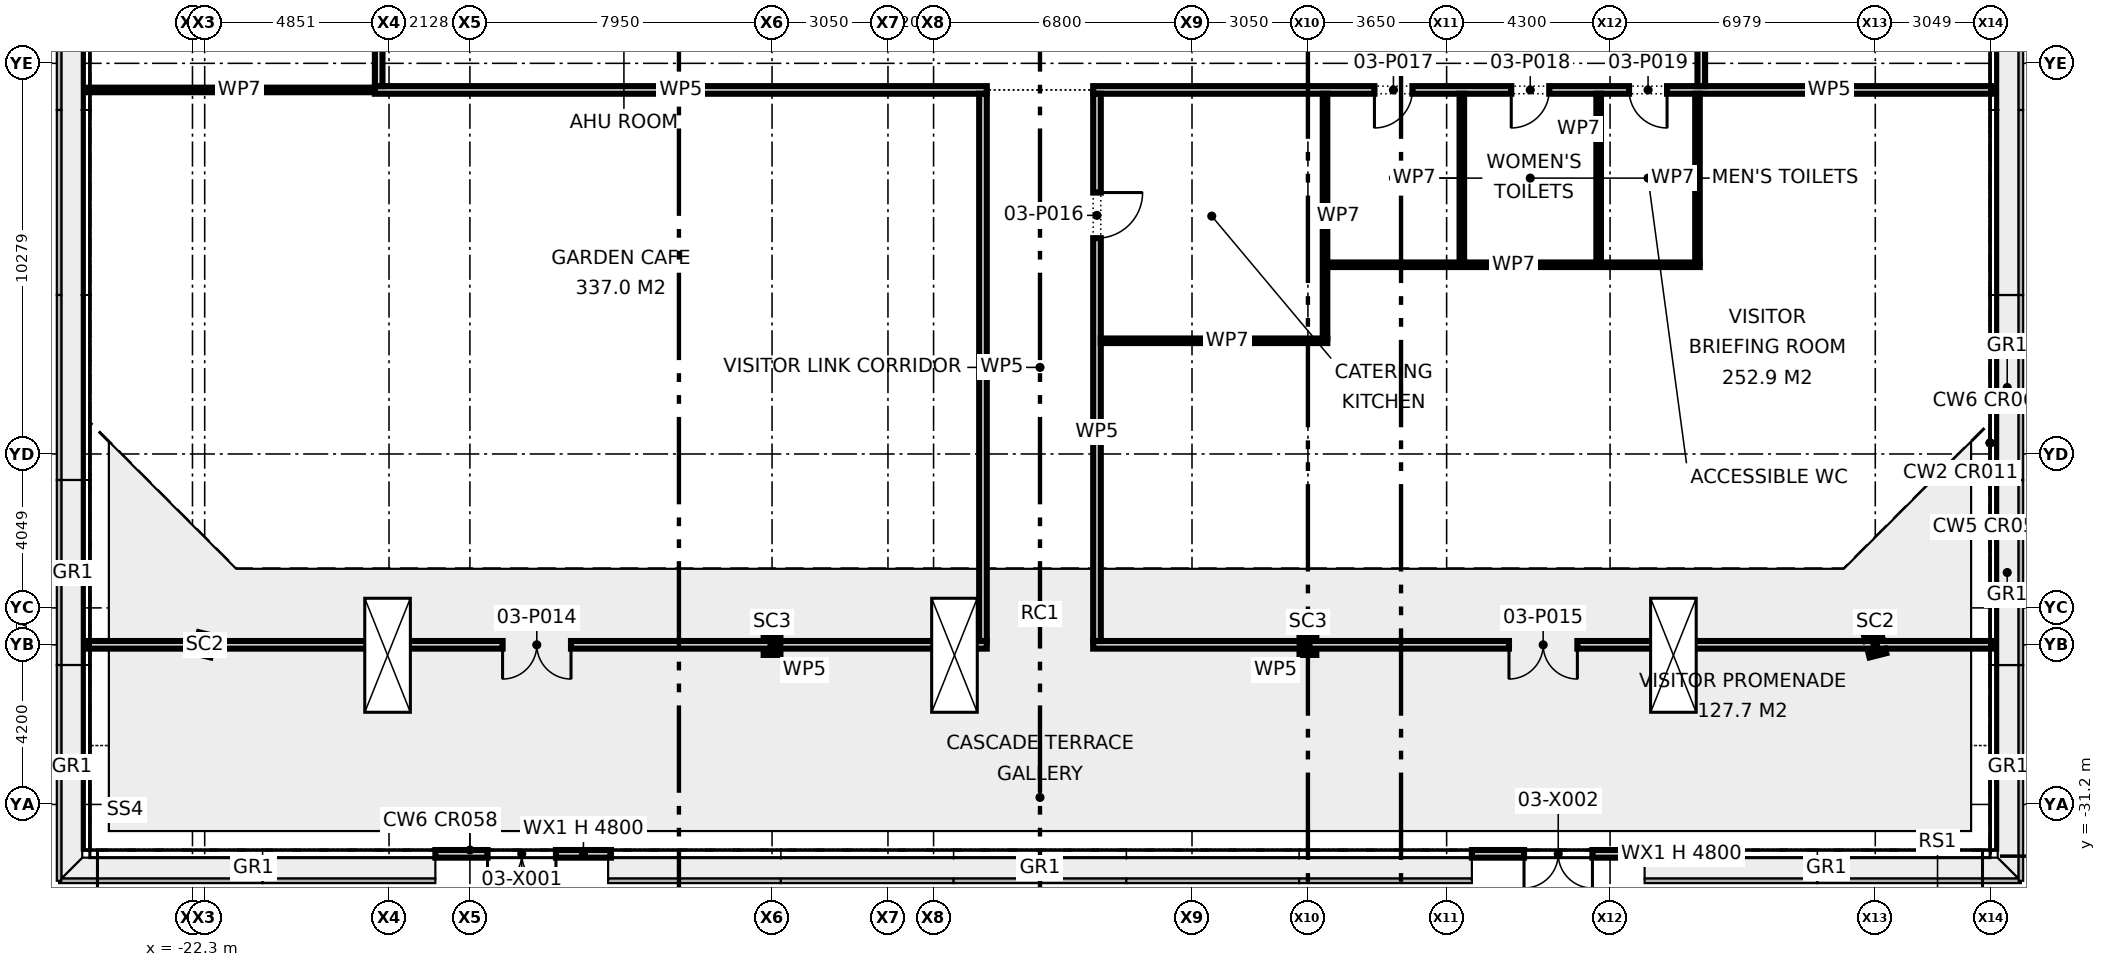
"""IFC4 building model, lengths in metres.
Left out: names, types, materials, properties, quantities, classifications, styles, units other than length and angle.
Written with IfcOpenShell. Run it as: python <this file> out.ifc"""

import sys

from ifc_helpers import new_model, si_unit, direction, frame, frame_2d, origin, origin_2d, place, context, subcontext, project, spatial, rectangle, i_section, extrude, element, fill, save


model = new_model("IFC4")
c1 = context("Model", 3, precision=1e-05, world=origin(), true_north=direction((0.0, 1.0)))
c2 = subcontext(c1, "Body", "Model", "MODEL_VIEW")
j1 = project(units=[si_unit("LENGTHUNIT", "METRE"), si_unit("PLANEANGLEUNIT", "RADIAN")], contexts=[c1])
p1 = place(None, origin())
s1 = spatial("IfcSite", under=j1, at=p1, CompositionType="ELEMENT")
p2 = place(p1, origin())
s2 = spatial("IfcBuilding", under=s1, at=p2, CompositionType="ELEMENT")
p3 = place(p2, frame((0.0, 0.0, 11.3)))
s3 = spatial("IfcBuildingStorey", under=s2, at=p3, CompositionType="ELEMENT", Elevation=11.3)
p4 = place(p3, frame((-21.979, -27.0, 0.0), z_axis=(0.0, 0.0, 1.0), x_axis=(0.969751540043, -0.244094142872, 0.0)))
e1 = element("IfcColumn", 1, at=p4, inside=s3, PredefinedType="COLUMN", context=c2, shape_type="SweptSolid", body=[
    extrude(i_section(OverallWidth=0.455, OverallDepth=0.569, WebThickness=0.078, FlangeThickness=0.125, FilletRadius=0.015, at=origin_2d()), origin(), (0.0, 0.0, 1.0), 4.8),
])
for number, where, z_axis, x_axis in (
    (2, (-7.05, -27.0, 0.0), (0.0, 0.0, 1.0), (1.0, 0.0, 0.0)),
    (3, (7.05, -27.0, 0.0), (0.0, 0.0, 1.0), (1.0, 0.0, 0.0)),
):
    element("IfcColumn", number, at=place(p3, frame(where, z_axis=z_axis, x_axis=x_axis)), inside=s3, PredefinedType="COLUMN", context=c2, shape_type="SweptSolid", body=[
        extrude(i_section(OverallWidth=0.442, OverallDepth=0.531, WebThickness=0.066, FlangeThickness=0.106, FilletRadius=0.015, at=origin_2d()), origin(), (0.0, 0.0, 1.0), 4.8),
    ])
p5 = place(p3, frame((21.979, -27.0, 0.0), z_axis=(0.0, 0.0, 1.0), x_axis=(0.969751540043, 0.244094142872, 0.0)))
e4 = element("IfcColumn", 4, at=p5, inside=s3, PredefinedType="COLUMN", context=c2, shape_type="SweptSolid", body=[
    extrude(i_section(OverallWidth=0.455, OverallDepth=0.569, WebThickness=0.078, FlangeThickness=0.125, FilletRadius=0.015, at=origin_2d()), origin(), (0.0, 0.0, 1.0), 4.8),
])
p6 = place(p3, frame((-15.909, -32.5, 0.0), z_axis=(0.0, 0.0, 1.0), x_axis=(1.0, 0.0, 0.0)))
e5 = element("IfcWall", 5, at=p6, inside=s3, PredefinedType="STANDARD", context=c2, shape_type="SweptSolid", body=[
    extrude(rectangle(XDim=4.621, YDim=0.2, at=frame_2d((2.31, 0.0))), origin(), (0.0, 0.0, 1.0), 4.8),
])
p7 = place(p6, frame((1.373, 0.0, 0.0)))
e6 = element("IfcOpeningElement", 6, at=p7, cuts=e5, PredefinedType="OPENING", context=c2, shape_type="SweptSolid", body=[
    extrude(rectangle(XDim=1.8, YDim=2.1, at=frame_2d((0.9, 1.05))), frame((0.0, 0.11, 0.0), z_axis=(0.0, -1.0, 0.0), x_axis=(1.0, 0.0, 0.0)), (0.0, 0.0, 1.0), 0.22),
])
p8 = place(p3, frame((11.364, -32.5, 0.0), z_axis=(0.0, 0.0, 1.0), x_axis=(1.0, 0.0, 0.0)))
e7 = element("IfcWall", 7, at=p8, inside=s3, PredefinedType="STANDARD", context=c2, shape_type="SweptSolid", body=[
    extrude(rectangle(XDim=4.621, YDim=0.2, at=frame_2d((2.31, 0.0))), origin(), (0.0, 0.0, 1.0), 4.8),
])
p9 = place(p8, frame((1.373, 0.0, 0.0)))
e8 = element("IfcOpeningElement", 8, at=p9, cuts=e7, PredefinedType="OPENING", context=c2, shape_type="SweptSolid", body=[
    extrude(rectangle(XDim=1.8, YDim=2.1, at=frame_2d((0.9, 1.05))), frame((0.0, 0.11, 0.0), z_axis=(0.0, -1.0, 0.0), x_axis=(1.0, 0.0, 0.0)), (0.0, 0.0, 1.0), 0.22),
])
p10 = place(p3, frame((-25.03, -27.0, 0.0), z_axis=(0.0, 0.0, 1.0), x_axis=(1.0, 0.0, 0.0)))
e9 = element("IfcWall", 9, at=p10, inside=s3, PredefinedType="PARTITIONING", context=c2, shape_type="SweptSolid", body=[
    extrude(rectangle(XDim=23.63, YDim=0.2, at=frame_2d((11.815, 0.0))), origin(), (0.0, 0.0, 1.0), 4.575),
])
p11 = place(p10, frame((10.89, 0.0, 0.0)))
e10 = element("IfcOpeningElement", 10, at=p11, cuts=e9, PredefinedType="OPENING", context=c2, shape_type="SweptSolid", body=[
    extrude(rectangle(XDim=1.8, YDim=2.1, at=frame_2d((0.9, 1.05))), frame((0.0, 0.11, 0.0), z_axis=(0.0, -1.0, 0.0), x_axis=(1.0, 0.0, 0.0)), (0.0, 0.0, 1.0), 0.22),
])
p12 = place(p3, frame((1.4, -27.0, 0.0), z_axis=(0.0, 0.0, 1.0), x_axis=(1.0, 0.0, 0.0)))
e11 = element("IfcWall", 11, at=p12, inside=s3, PredefinedType="PARTITIONING", context=c2, shape_type="SweptSolid", body=[
    extrude(rectangle(XDim=23.63, YDim=0.2, at=frame_2d((11.815, 0.0))), origin(), (0.0, 0.0, 1.0), 4.575),
])
p13 = place(p12, frame((10.94, 0.0, 0.0)))
e12 = element("IfcOpeningElement", 12, at=p13, cuts=e11, PredefinedType="OPENING", context=c2, shape_type="SweptSolid", body=[
    extrude(rectangle(XDim=1.8, YDim=2.1, at=frame_2d((0.9, 1.05))), frame((0.0, 0.11, 0.0), z_axis=(0.0, -1.0, 0.0), x_axis=(1.0, 0.0, 0.0)), (0.0, 0.0, 1.0), 0.22),
])
p14 = place(p3, frame((-17.5, -12.4, 0.0), z_axis=(0.0, 0.0, 1.0), x_axis=(1.0, 0.0, 0.0)))
e13 = element("IfcWall", 13, at=p14, inside=s3, PredefinedType="PARTITIONING", context=c2, shape_type="SweptSolid", body=[
    extrude(rectangle(XDim=16.1, YDim=0.2, at=frame_2d((8.05, 0.0))), origin(), (0.0, 0.0, 1.0), 4.575),
])
p15 = place(p3, frame((1.4, -12.4, 0.0), z_axis=(0.0, 0.0, 1.0), x_axis=(1.0, 0.0, 0.0)))
e14 = element("IfcWall", 14, at=p15, inside=s3, PredefinedType="PARTITIONING", context=c2, shape_type="SweptSolid", body=[
    extrude(rectangle(XDim=23.63, YDim=0.2, at=frame_2d((11.815, 0.0))), origin(), (0.0, 0.0, 1.0), 4.575),
])
p16 = place(p15, frame((7.4, 0.0, 0.0)))
e15 = element("IfcOpeningElement", 15, at=p16, cuts=e14, PredefinedType="OPENING", context=c2, shape_type="SweptSolid", body=[
    extrude(rectangle(XDim=1.0, YDim=2.1, at=frame_2d((0.5, 1.05))), frame((0.0, 0.11, 0.0), z_axis=(0.0, -1.0, 0.0), x_axis=(1.0, 0.0, 0.0)), (0.0, 0.0, 1.0), 0.22),
])
p17 = place(p15, frame((11.0, 0.0, 0.0)))
e16 = element("IfcOpeningElement", 16, at=p17, cuts=e14, PredefinedType="OPENING", context=c2, shape_type="SweptSolid", body=[
    extrude(rectangle(XDim=1.0, YDim=2.1, at=frame_2d((0.5, 1.05))), frame((0.0, 0.11, 0.0), z_axis=(0.0, -1.0, 0.0), x_axis=(1.0, 0.0, 0.0)), (0.0, 0.0, 1.0), 0.22),
])
p18 = place(p15, frame((14.1, 0.0, 0.0)))
e17 = element("IfcOpeningElement", 17, at=p18, cuts=e14, PredefinedType="OPENING", context=c2, shape_type="SweptSolid", body=[
    extrude(rectangle(XDim=1.0, YDim=2.1, at=frame_2d((0.5, 1.05))), frame((0.0, 0.11, 0.0), z_axis=(0.0, -1.0, 0.0), x_axis=(1.0, 0.0, 0.0)), (0.0, 0.0, 1.0), 0.22),
])
p19 = place(p3, frame((17.4, -12.3, 0.0), z_axis=(0.0, 0.0, 1.0), x_axis=(0.0, 1.0, 0.0)))
e18 = element("IfcWall", 18, at=p19, inside=s3, PredefinedType="PARTITIONING", context=c2, shape_type="SweptSolid", body=[
    extrude(rectangle(XDim=24.6, YDim=0.2, at=frame_2d((12.3, 0.0))), origin(), (0.0, 0.0, 1.0), 4.575),
])
p20 = place(p19, frame((6.375, 0.0, 0.0)))
e19 = element("IfcOpeningElement", 19, at=p20, cuts=e18, PredefinedType="OPENING", context=c2, shape_type="SweptSolid", body=[
    extrude(rectangle(XDim=1.8, YDim=2.1, at=frame_2d((0.9, 1.05))), frame((0.0, 0.11, 0.0), z_axis=(0.0, -1.0, 0.0), x_axis=(1.0, 0.0, 0.0)), (0.0, 0.0, 1.0), 0.22),
])
p21 = place(p19, frame((19.075, 0.0, 0.0)))
e20 = element("IfcOpeningElement", 20, at=p21, cuts=e18, PredefinedType="OPENING", context=c2, shape_type="SweptSolid", body=[
    extrude(rectangle(XDim=1.2, YDim=2.1, at=frame_2d((0.6, 1.05))), frame((0.0, 0.11, 0.0), z_axis=(0.0, -1.0, 0.0), x_axis=(1.0, 0.0, 0.0)), (0.0, 0.0, 1.0), 0.22),
])
p22 = place(p3, frame((1.5, -26.9, 0.0), z_axis=(0.0, 0.0, 1.0), x_axis=(0.0, 1.0, 0.0)))
e21 = element("IfcWall", 21, at=p22, inside=s3, PredefinedType="PARTITIONING", context=c2, shape_type="SweptSolid", body=[
    extrude(rectangle(XDim=14.4, YDim=0.2, at=frame_2d((7.2, 0.0))), origin(), (0.0, 0.0, 1.0), 4.575),
])
p23 = place(p22, frame((10.6, 0.0, 0.0)))
e22 = element("IfcOpeningElement", 22, at=p23, cuts=e21, PredefinedType="OPENING", context=c2, shape_type="SweptSolid", body=[
    extrude(rectangle(XDim=1.2, YDim=2.1, at=frame_2d((0.6, 1.05))), frame((0.0, 0.11, 0.0), z_axis=(0.0, -1.0, 0.0), x_axis=(1.0, 0.0, 0.0)), (0.0, 0.0, 1.0), 0.22),
])
p24 = place(p3, frame((-1.5, -26.9, 0.0), z_axis=(0.0, 0.0, 1.0), x_axis=(0.0, 1.0, 0.0)))
e23 = element("IfcWall", 23, at=p24, inside=s3, PredefinedType="PARTITIONING", context=c2, shape_type="SweptSolid", body=[
    extrude(rectangle(XDim=14.4, YDim=0.2, at=frame_2d((7.2, 0.0))), origin(), (0.0, 0.0, 1.0), 4.575),
])
p25 = place(p3, frame((-17.4, -12.3, 0.0), z_axis=(0.0, 0.0, 1.0), x_axis=(0.0, 1.0, 0.0)))
e24 = element("IfcWall", 24, at=p25, inside=s3, PredefinedType="PARTITIONING", context=c2, shape_type="SweptSolid", body=[
    extrude(rectangle(XDim=24.6, YDim=0.2, at=frame_2d((12.3, 0.0))), origin(), (0.0, 0.0, 1.0), 4.575),
])
p26 = place(p25, frame((6.675, 0.0, 0.0)))
e25 = element("IfcOpeningElement", 25, at=p26, cuts=e24, PredefinedType="OPENING", context=c2, shape_type="SweptSolid", body=[
    extrude(rectangle(XDim=1.2, YDim=2.1, at=frame_2d((0.6, 1.05))), frame((0.0, 0.11, 0.0), z_axis=(0.0, -1.0, 0.0), x_axis=(1.0, 0.0, 0.0)), (0.0, 0.0, 1.0), 0.22),
])
p27 = place(p25, frame((18.775, 0.0, 0.0)))
e26 = element("IfcOpeningElement", 26, at=p27, cuts=e24, PredefinedType="OPENING", context=c2, shape_type="SweptSolid", body=[
    extrude(rectangle(XDim=1.8, YDim=2.1, at=frame_2d((0.9, 1.05))), frame((0.0, 0.11, 0.0), z_axis=(0.0, -1.0, 0.0), x_axis=(1.0, 0.0, 0.0)), (0.0, 0.0, 1.0), 0.22),
])
p28 = place(p3, frame((1.6, -19.0, 0.0), z_axis=(0.0, 0.0, 1.0), x_axis=(1.0, 0.0, 0.0)))
e27 = element("IfcWall", 27, at=p28, inside=s3, PredefinedType="PARTITIONING", context=c2, shape_type="SweptSolid", body=[
    extrude(rectangle(XDim=5.96, YDim=0.12, at=frame_2d((2.98, 0.0))), origin(), (0.0, 0.0, 1.0), 4.575),
])
p29 = place(p3, frame((7.56, -17.0, 0.0), z_axis=(0.0, 0.0, 1.0), x_axis=(1.0, 0.0, 0.0)))
e28 = element("IfcWall", 28, at=p29, inside=s3, PredefinedType="PARTITIONING", context=c2, shape_type="SweptSolid", body=[
    extrude(rectangle(XDim=9.8, YDim=0.12, at=frame_2d((4.9, 0.0))), origin(), (0.0, 0.0, 1.0), 4.575),
])
p30 = place(p3, frame((-25.03, -12.4, 0.0), z_axis=(0.0, 0.0, 1.0), x_axis=(1.0, 0.0, 0.0)))
e29 = element("IfcWall", 29, at=p30, inside=s3, PredefinedType="PARTITIONING", context=c2, shape_type="SweptSolid", body=[
    extrude(rectangle(XDim=7.53, YDim=0.12, at=frame_2d((3.765, 0.0))), origin(), (0.0, 0.0, 1.0), 4.575),
])
for number, where, z_axis, x_axis in (
    (30, (17.3, -16.94, 0.0), (0.0, 0.0, 1.0), (0.0, 1.0, 0.0)),
    (31, (14.7, -16.94, 0.0), (0.0, 0.0, 1.0), (0.0, 1.0, 0.0)),
    (32, (11.1, -16.94, 0.0), (0.0, 0.0, 1.0), (0.0, 1.0, 0.0)),
):
    element("IfcWall", number, at=place(p3, frame(where, z_axis=z_axis, x_axis=x_axis)), inside=s3, PredefinedType="PARTITIONING", context=c2, shape_type="SweptSolid", body=[
        extrude(rectangle(XDim=4.44, YDim=0.12, at=frame_2d((2.22, 0.0))), origin(), (0.0, 0.0, 1.0), 4.575),
    ])
p31 = place(p3, frame((7.5, -18.94, 0.0), z_axis=(0.0, 0.0, 1.0), x_axis=(0.0, 1.0, 0.0)))
e33 = element("IfcWall", 33, at=p31, inside=s3, PredefinedType="PARTITIONING", context=c2, shape_type="SweptSolid", body=[
    extrude(rectangle(XDim=6.44, YDim=0.12, at=frame_2d((3.22, 0.0))), origin(), (0.0, 0.0, 1.0), 4.575),
])
p32 = place(p7, frame((1.8, 0.0, 0.0), z_axis=(0.0, 0.0, 1.0), x_axis=(-1.0, 0.0, 0.0)))
e34 = element("IfcDoor", 34, at=p32, inside=s3, OperationType="DOUBLE_DOOR_DOUBLE_SWING", PredefinedType="DOOR", context=c2, shape_type="SweptSolid", body=[
    extrude(rectangle(XDim=1.8, YDim=2.1, at=frame_2d((0.9, 1.05))), frame((0.0, 0.025, 0.0), z_axis=(0.0, -1.0, 0.0), x_axis=(1.0, 0.0, 0.0)), (0.0, 0.0, 1.0), 0.05),
])
fill(e6, e34)
p33 = place(p9, frame((1.8, 0.0, 0.0), z_axis=(0.0, 0.0, 1.0), x_axis=(-1.0, 0.0, 0.0)))
e35 = element("IfcDoor", 35, at=p33, inside=s3, OperationType="DOUBLE_DOOR_DOUBLE_SWING", PredefinedType="DOOR", context=c2, shape_type="SweptSolid", body=[
    extrude(rectangle(XDim=1.8, YDim=2.1, at=frame_2d((0.9, 1.05))), frame((0.0, 0.025, 0.0), z_axis=(0.0, -1.0, 0.0), x_axis=(1.0, 0.0, 0.0)), (0.0, 0.0, 1.0), 0.05),
])
fill(e8, e35)
p34 = place(p11, frame((1.8, 0.0, 0.0), z_axis=(0.0, 0.0, 1.0), x_axis=(-1.0, 0.0, 0.0)))
e36 = element("IfcDoor", 36, at=p34, inside=s3, OperationType="DOUBLE_DOOR_SINGLE_SWING", PredefinedType="DOOR", context=c2, shape_type="SweptSolid", body=[
    extrude(rectangle(XDim=1.8, YDim=2.1, at=frame_2d((0.9, 1.05))), frame((0.0, 0.025, 0.0), z_axis=(0.0, -1.0, 0.0), x_axis=(1.0, 0.0, 0.0)), (0.0, 0.0, 1.0), 0.05),
])
fill(e10, e36)
p35 = place(p13, frame((1.8, 0.0, 0.0), z_axis=(0.0, 0.0, 1.0), x_axis=(-1.0, 0.0, 0.0)))
e37 = element("IfcDoor", 37, at=p35, inside=s3, OperationType="DOUBLE_DOOR_SINGLE_SWING", PredefinedType="DOOR", context=c2, shape_type="SweptSolid", body=[
    extrude(rectangle(XDim=1.8, YDim=2.1, at=frame_2d((0.9, 1.05))), frame((0.0, 0.025, 0.0), z_axis=(0.0, -1.0, 0.0), x_axis=(1.0, 0.0, 0.0)), (0.0, 0.0, 1.0), 0.05),
])
fill(e12, e37)
p36 = place(p23, frame((1.2, 0.0, 0.0), z_axis=(0.0, 0.0, 1.0), x_axis=(-1.0, 0.0, 0.0)))
e38 = element("IfcDoor", 38, at=p36, inside=s3, OperationType="SINGLE_SWING_LEFT", PredefinedType="DOOR", context=c2, shape_type="SweptSolid", body=[
    extrude(rectangle(XDim=1.2, YDim=2.1, at=frame_2d((0.6, 1.05))), frame((0.0, 0.025, 0.0), z_axis=(0.0, -1.0, 0.0), x_axis=(1.0, 0.0, 0.0)), (0.0, 0.0, 1.0), 0.05),
])
fill(e22, e38)
p37 = place(p16, frame((1.0, 0.0, 0.0), z_axis=(0.0, 0.0, 1.0), x_axis=(-1.0, 0.0, 0.0)))
e39 = element("IfcDoor", 39, at=p37, inside=s3, OperationType="SINGLE_SWING_RIGHT", PredefinedType="DOOR", context=c2, shape_type="SweptSolid", body=[
    extrude(rectangle(XDim=1.0, YDim=2.1, at=frame_2d((0.5, 1.05))), frame((0.0, 0.025, 0.0), z_axis=(0.0, -1.0, 0.0), x_axis=(1.0, 0.0, 0.0)), (0.0, 0.0, 1.0), 0.05),
])
fill(e15, e39)
p38 = place(p17, frame((1.0, 0.0, 0.0), z_axis=(0.0, 0.0, 1.0), x_axis=(-1.0, 0.0, 0.0)))
e40 = element("IfcDoor", 40, at=p38, inside=s3, OperationType="SINGLE_SWING_RIGHT", PredefinedType="DOOR", context=c2, shape_type="SweptSolid", body=[
    extrude(rectangle(XDim=1.0, YDim=2.1, at=frame_2d((0.5, 1.05))), frame((0.0, 0.025, 0.0), z_axis=(0.0, -1.0, 0.0), x_axis=(1.0, 0.0, 0.0)), (0.0, 0.0, 1.0), 0.05),
])
fill(e16, e40)
p39 = place(p18, frame((1.0, 0.0, 0.0), z_axis=(0.0, 0.0, 1.0), x_axis=(-1.0, 0.0, 0.0)))
e41 = element("IfcDoor", 41, at=p39, inside=s3, OperationType="SINGLE_SWING_LEFT", PredefinedType="DOOR", context=c2, shape_type="SweptSolid", body=[
    extrude(rectangle(XDim=1.0, YDim=2.1, at=frame_2d((0.5, 1.05))), frame((0.0, 0.025, 0.0), z_axis=(0.0, -1.0, 0.0), x_axis=(1.0, 0.0, 0.0)), (0.0, 0.0, 1.0), 0.05),
])
fill(e17, e41)
save(model, sys.argv[1])
